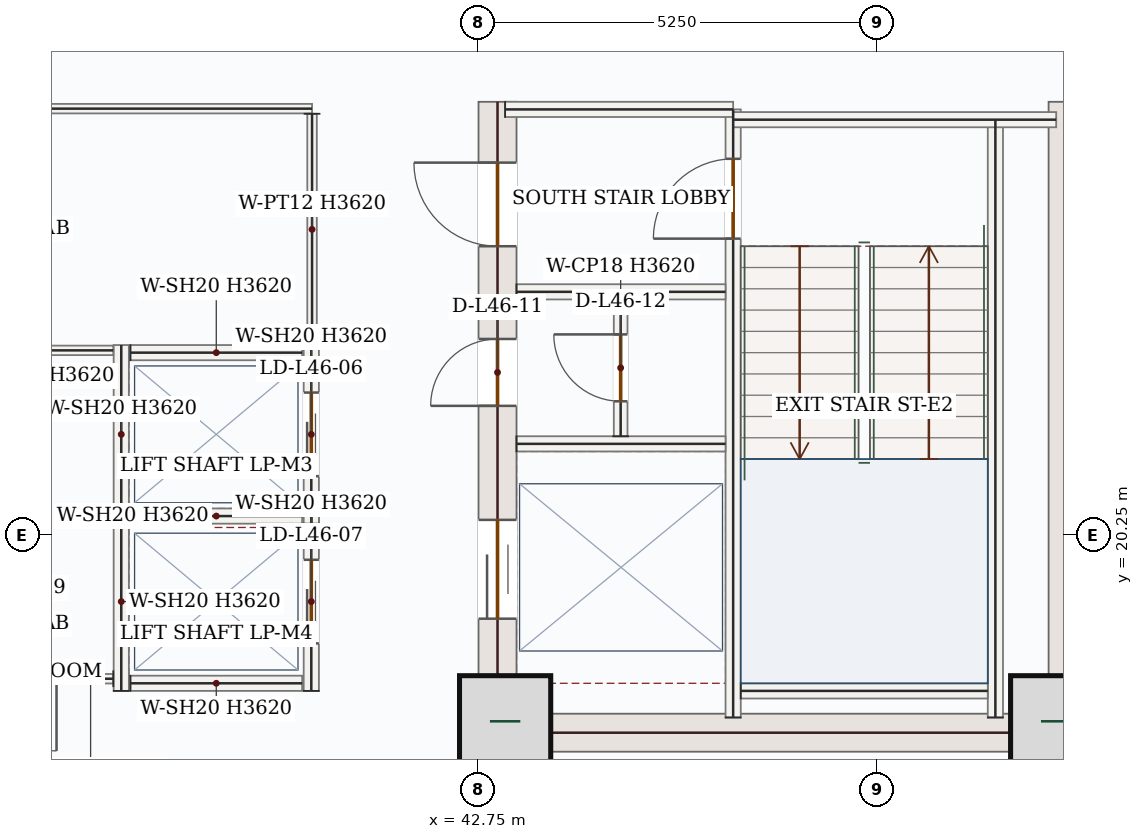
"""IFC4 building model, lengths in metres.
Left out: names, types, materials, properties, quantities, classifications, styles, units other than length and angle.
Written with IfcOpenShell. Run it as: python <this file> out.ifc"""

import sys

from ifc_helpers import new_model, si_unit, direction, frame, frame_2d, origin, origin_2d, place, context, subcontext, project, spatial, rectangle, extrude, source, transform, mapped, element, fill, save


model = new_model("IFC4")
c1 = context("Model", 3, precision=1e-05, world=origin(), true_north=direction((0.0, 1.0)))
c2 = subcontext(c1, "Body", "Model", "MODEL_VIEW")
j1 = project(units=[si_unit("LENGTHUNIT", "METRE"), si_unit("PLANEANGLEUNIT", "RADIAN")], contexts=[c1])
p1 = place(None, origin())
s1 = spatial("IfcSite", under=j1, at=p1, CompositionType="ELEMENT")
p2 = place(p1, origin())
s2 = spatial("IfcBuilding", under=s1, at=p2, CompositionType="ELEMENT")
p3 = place(p2, frame((0.0, 0.0, 198.0)))
s3 = spatial("IfcBuildingStorey", under=s2, at=p3, CompositionType="ELEMENT", Elevation=198.0)
p4 = place(p3, frame((43.0, 17.4, 0.0), z_axis=(0.0, 0.0, 1.0), x_axis=(0.0, 1.0, 0.0)))
e1 = element("IfcWall", 1, at=p4, inside=s3, PredefinedType="SHEAR", context=c2, shape_type="SweptSolid", body=[
    extrude(rectangle(XDim=8.55, YDim=0.5, at=frame_2d((4.275, 0.0))), origin(), (0.0, 0.0, 1.0), 3.62),
])
p5 = place(p4, frame((6.65, 0.0, 0.0)))
e2 = element("IfcOpeningElement", 2, at=p5, cuts=e1, PredefinedType="OPENING", context=c2, shape_type="SweptSolid", body=[
    extrude(rectangle(XDim=1.1, YDim=2.2, at=frame_2d((0.55, 1.1))), frame((0.0, 0.26, 0.0), z_axis=(0.0, -1.0, 0.0), x_axis=(1.0, 0.0, 0.0)), (0.0, 0.0, 1.0), 0.52),
])
p6 = place(p4, frame((1.75, 0.0, 0.0)))
e3 = element("IfcOpeningElement", 3, at=p6, cuts=e1, PredefinedType="OPENING", context=c2, shape_type="SweptSolid", body=[
    extrude(rectangle(XDim=1.3, YDim=2.2, at=frame_2d((0.65, 1.1))), frame((0.0, 0.26, 0.0), z_axis=(0.0, -1.0, 0.0), x_axis=(1.0, 0.0, 0.0)), (0.0, 0.0, 1.0), 0.52),
])
p7 = place(p4, frame((4.55, 0.0, 0.0)))
e4 = element("IfcOpeningElement", 4, at=p7, cuts=e1, PredefinedType="OPENING", context=c2, shape_type="SweptSolid", body=[
    extrude(rectangle(XDim=0.88, YDim=2.1, at=frame_2d((0.44, 1.05))), frame((0.0, 0.26, 0.0), z_axis=(0.0, -1.0, 0.0), x_axis=(1.0, 0.0, 0.0)), (0.0, 0.0, 1.0), 0.52),
])
m1 = source(origin(), c2, "Body", "SweptSolid", [
    extrude(rectangle(XDim=8.55, YDim=0.5, at=frame_2d((4.275, 0.0))), origin(), (0.0, 0.0, 1.0), 3.62),
])
p8 = place(p3, frame((50.5, 17.4, 0.0), z_axis=(0.0, 0.0, 1.0), x_axis=(0.0, 1.0, 0.0)))
e5 = element("IfcWall", 5, at=p8, inside=s3, PredefinedType="SHEAR", context=c2, shape_type="MappedRepresentation", body=[
    mapped(m1, transform((0.0, 0.0, 0.0), x_axis=(1.0, 0.0, 0.0), y_axis=(0.0, 1.0, 0.0), z_axis=(0.0, 0.0, 1.0), scale=1.0)),
])
m2 = source(origin(), c2, "Body", "SweptSolid", [
    extrude(rectangle(XDim=7.0, YDim=0.5, at=frame_2d((3.5, 0.0))), origin(), (0.0, 0.0, 1.0), 3.62),
])
p9 = place(p3, frame((43.25, 17.65, 0.0), z_axis=(0.0, 0.0, 1.0), x_axis=(1.0, 0.0, 0.0)))
e6 = element("IfcWall", 6, at=p9, inside=s3, PredefinedType="SHEAR", context=c2, shape_type="MappedRepresentation", body=[
    mapped(m2, transform((0.0, 0.0, 0.0), x_axis=(1.0, 0.0, 0.0), y_axis=(0.0, 1.0, 0.0), z_axis=(0.0, 0.0, 1.0), scale=1.0)),
])
m3 = source(origin(), c2, "Body", "SweptSolid", [
    extrude(rectangle(XDim=1.2, YDim=1.2, at=origin_2d()), origin(), (0.0, 0.0, 1.0), 3.9),
])
for number, where, z_axis, x_axis in (
    (7, (43.1, 17.8, 0.0), (0.0, 0.0, 1.0), (1.0, 0.0, 0.0)),
    (8, (50.35, 17.8, 0.0), (0.0, 0.0, 1.0), (1.0, 0.0, 0.0)),
):
    element("IfcColumn", number, at=place(p3, frame(where, z_axis=z_axis, x_axis=x_axis)), inside=s3, PredefinedType="COLUMN", context=c2, shape_type="MappedRepresentation", body=[
        mapped(m3, transform((0.0, 0.0, 0.0), x_axis=(1.0, 0.0, 0.0), y_axis=(0.0, 1.0, 0.0), z_axis=(0.0, 0.0, 1.0), scale=1.0)),
    ])
p10 = place(p3, frame((53.06, 18.458, 0.0), z_axis=(0.0, 0.0, 1.0), x_axis=(-0.707106781187, -0.707106781187, 0.0)))
e9 = element("IfcWall", 9, at=p10, inside=s3, PredefinedType="SOLIDWALL", context=c2, shape_type="SweptSolid", body=[
    extrude(rectangle(XDim=5.258, YDim=0.28, at=frame_2d((2.629, 0.0))), origin(), (0.0, 0.0, 1.0), 3.62),
])
p11 = place(p10, frame((1.729, 0.0, 0.85)))
e10 = element("IfcOpeningElement", 10, at=p11, cuts=e9, PredefinedType="OPENING", context=c2, shape_type="SweptSolid", body=[
    extrude(rectangle(XDim=1.8, YDim=1.75, at=frame_2d((0.9, 0.875))), frame((0.0, 0.15, 0.0), z_axis=(0.0, -1.0, 0.0), x_axis=(1.0, 0.0, 0.0)), (0.0, 0.0, 1.0), 0.3),
])
m4 = source(origin(), c2, "Body", "SweptSolid", [
    extrude(rectangle(XDim=7.87, YDim=0.2, at=frame_2d((3.935, 0.0))), origin(), (0.0, 0.0, 1.0), 3.62),
])
p12 = place(p3, frame((49.55, 17.85, 0.0), z_axis=(0.0, 0.0, 1.0), x_axis=(0.0, 1.0, 0.0)))
e11 = element("IfcWall", 11, at=p12, inside=s3, PredefinedType="SOLIDWALL", context=c2, shape_type="MappedRepresentation", body=[
    mapped(m4, transform((0.0, 0.0, 0.0), x_axis=(1.0, 0.0, 0.0), y_axis=(0.0, 1.0, 0.0), z_axis=(0.0, 0.0, 1.0), scale=1.0)),
])
p13 = place(p3, frame((46.1, 17.85, 0.0), z_axis=(0.0, 0.0, 1.0), x_axis=(0.0, 1.0, 0.0)))
e12 = element("IfcWall", 12, at=p13, inside=s3, PredefinedType="SOLIDWALL", context=c2, shape_type="SweptSolid", body=[
    extrude(rectangle(XDim=8.0, YDim=0.2, at=frame_2d((4.0, 0.0))), origin(), (0.0, 0.0, 1.0), 3.62),
])
p14 = place(p13, frame((6.3, 0.0, 0.0)))
e13 = element("IfcOpeningElement", 13, at=p14, cuts=e12, PredefinedType="OPENING", context=c2, shape_type="SweptSolid", body=[
    extrude(rectangle(XDim=1.05, YDim=2.15, at=frame_2d((0.525, 1.075))), frame((0.0, 0.11, 0.0), z_axis=(0.0, -1.0, 0.0), x_axis=(1.0, 0.0, 0.0)), (0.0, 0.0, 1.0), 0.22),
])
m5 = source(origin(), c2, "Body", "SweptSolid", [
    extrude(rectangle(XDim=3.0, YDim=0.2, at=frame_2d((1.5, 0.0))), origin(), (0.0, 0.0, 1.0), 3.62),
])
p15 = place(p3, frame((43.1, 25.85, 0.0), z_axis=(0.0, 0.0, 1.0), x_axis=(1.0, 0.0, 0.0)))
e14 = element("IfcWall", 14, at=p15, inside=s3, PredefinedType="SOLIDWALL", context=c2, shape_type="MappedRepresentation", body=[
    mapped(m5, transform((0.0, 0.0, 0.0), x_axis=(1.0, 0.0, 0.0), y_axis=(0.0, 1.0, 0.0), z_axis=(0.0, 0.0, 1.0), scale=1.0)),
])
m6 = source(origin(), c2, "Body", "SweptSolid", [
    extrude(rectangle(XDim=4.25, YDim=0.2, at=frame_2d((2.125, 0.0))), origin(), (0.0, 0.0, 1.0), 3.62),
])
p16 = place(p3, frame((46.1, 25.715, 0.0), z_axis=(0.0, 0.0, 1.0), x_axis=(1.0, 0.0, 0.0)))
e15 = element("IfcWall", 15, at=p16, inside=s3, PredefinedType="SOLIDWALL", context=c2, shape_type="MappedRepresentation", body=[
    mapped(m6, transform((0.0, 0.0, 0.0), x_axis=(1.0, 0.0, 0.0), y_axis=(0.0, 1.0, 0.0), z_axis=(0.0, 0.0, 1.0), scale=1.0)),
])
m7 = source(origin(), c2, "Body", "SweptSolid", [
    extrude(rectangle(XDim=3.25, YDim=0.2, at=frame_2d((1.625, 0.0))), origin(), (0.0, 0.0, 1.0), 3.62),
])
p17 = place(p3, frame((46.2, 18.2, 0.0), z_axis=(0.0, 0.0, 1.0), x_axis=(1.0, 0.0, 0.0)))
e16 = element("IfcWall", 16, at=p17, inside=s3, PredefinedType="SOLIDWALL", context=c2, shape_type="MappedRepresentation", body=[
    mapped(m7, transform((0.0, 0.0, 0.0), x_axis=(1.0, 0.0, 0.0), y_axis=(0.0, 1.0, 0.0), z_axis=(0.0, 0.0, 1.0), scale=1.0)),
])
m8 = source(origin(), c2, "Body", "SweptSolid", [
    extrude(rectangle(XDim=2.75, YDim=0.2, at=frame_2d((1.375, 0.0))), origin(), (0.0, 0.0, 1.0), 3.62),
])
for number, where, z_axis, x_axis in (
    (17, (43.25, 23.45, 0.0), (0.0, 0.0, 1.0), (1.0, 0.0, 0.0)),
    (18, (43.25, 21.45, 0.0), (0.0, 0.0, 1.0), (1.0, 0.0, 0.0)),
):
    element("IfcWall", number, at=place(p3, frame(where, z_axis=z_axis, x_axis=x_axis)), inside=s3, PredefinedType="SOLIDWALL", context=c2, shape_type="MappedRepresentation", body=[
        mapped(m8, transform((0.0, 0.0, 0.0), x_axis=(1.0, 0.0, 0.0), y_axis=(0.0, 1.0, 0.0), z_axis=(0.0, 0.0, 1.0), scale=1.0)),
    ])
p18 = place(p3, frame((44.62, 21.55, 0.0), z_axis=(0.0, 0.0, 1.0), x_axis=(0.0, 1.0, 0.0)))
e19 = element("IfcWall", 19, at=p18, inside=s3, PredefinedType="PARTITIONING", context=c2, shape_type="SweptSolid", body=[
    extrude(rectangle(XDim=1.8, YDim=0.18, at=frame_2d((0.9, 0.0))), origin(), (0.0, 0.0, 1.0), 3.62),
])
p19 = place(p18, frame((0.46, 0.0, 0.0)))
e20 = element("IfcOpeningElement", 20, at=p19, cuts=e19, PredefinedType="OPENING", context=c2, shape_type="SweptSolid", body=[
    extrude(rectangle(XDim=0.88, YDim=2.1, at=frame_2d((0.44, 1.05))), frame((0.0, 0.1, 0.0), z_axis=(0.0, -1.0, 0.0), x_axis=(1.0, 0.0, 0.0)), (0.0, 0.0, 1.0), 0.2),
])
m9 = source(origin(), c2, "Body", "SweptSolid", [
    extrude(rectangle(XDim=2.35, YDim=0.2, at=frame_2d((1.175, 0.0))), origin(), (0.0, 0.0, 1.0), 3.62),
])
p20 = place(p3, frame((38.05, 20.4, 0.0), z_axis=(0.0, 0.0, 1.0), x_axis=(0.0, 1.0, 0.0)))
e21 = element("IfcWall", 21, at=p20, inside=s3, PredefinedType="SOLIDWALL", context=c2, shape_type="MappedRepresentation", body=[
    mapped(m9, transform((0.0, 0.0, 0.0), x_axis=(1.0, 0.0, 0.0), y_axis=(0.0, 1.0, 0.0), z_axis=(0.0, 0.0, 1.0), scale=1.0)),
])
p21 = place(p3, frame((40.55, 20.4, 0.0), z_axis=(0.0, 0.0, 1.0), x_axis=(0.0, 1.0, 0.0)))
e22 = element("IfcWall", 22, at=p21, inside=s3, PredefinedType="SOLIDWALL", context=c2, shape_type="SweptSolid", body=[
    extrude(rectangle(XDim=2.35, YDim=0.2, at=frame_2d((1.175, 0.0))), origin(), (0.0, 0.0, 1.0), 3.62),
])
p22 = place(p21, frame((0.625, 0.0, 0.0)))
e23 = element("IfcOpeningElement", 23, at=p22, cuts=e22, PredefinedType="OPENING", context=c2, shape_type="SweptSolid", body=[
    extrude(rectangle(XDim=1.1, YDim=2.15, at=frame_2d((0.55, 1.075))), frame((0.0, 0.11, 0.0), z_axis=(0.0, -1.0, 0.0), x_axis=(1.0, 0.0, 0.0)), (0.0, 0.0, 1.0), 0.22),
])
m10 = source(origin(), c2, "Body", "SweptSolid", [
    extrude(rectangle(XDim=2.26, YDim=0.2, at=frame_2d((1.13, 0.0))), origin(), (0.0, 0.0, 1.0), 3.62),
])
for number, where, z_axis, x_axis in (
    (24, (38.17, 20.5, 0.0), (0.0, 0.0, 1.0), (1.0, 0.0, 0.0)),
    (25, (38.17, 22.65, 0.0), (0.0, 0.0, 1.0), (1.0, 0.0, 0.0)),
):
    element("IfcWall", number, at=place(p3, frame(where, z_axis=z_axis, x_axis=x_axis)), inside=s3, PredefinedType="SOLIDWALL", context=c2, shape_type="MappedRepresentation", body=[
        mapped(m10, transform((0.0, 0.0, 0.0), x_axis=(1.0, 0.0, 0.0), y_axis=(0.0, 1.0, 0.0), z_axis=(0.0, 0.0, 1.0), scale=1.0)),
    ])
p23 = place(p3, frame((38.05, 18.2, 0.0), z_axis=(0.0, 0.0, 1.0), x_axis=(0.0, 1.0, 0.0)))
e26 = element("IfcWall", 26, at=p23, inside=s3, PredefinedType="SOLIDWALL", context=c2, shape_type="MappedRepresentation", body=[
    mapped(m9, transform((0.0, 0.0, 0.0), x_axis=(1.0, 0.0, 0.0), y_axis=(0.0, 1.0, 0.0), z_axis=(0.0, 0.0, 1.0), scale=1.0)),
])
p24 = place(p3, frame((40.55, 18.2, 0.0), z_axis=(0.0, 0.0, 1.0), x_axis=(0.0, 1.0, 0.0)))
e27 = element("IfcWall", 27, at=p24, inside=s3, PredefinedType="SOLIDWALL", context=c2, shape_type="SweptSolid", body=[
    extrude(rectangle(XDim=2.35, YDim=0.2, at=frame_2d((1.175, 0.0))), origin(), (0.0, 0.0, 1.0), 3.62),
])
p25 = place(p24, frame((0.625, 0.0, 0.0)))
e28 = element("IfcOpeningElement", 28, at=p25, cuts=e27, PredefinedType="OPENING", context=c2, shape_type="SweptSolid", body=[
    extrude(rectangle(XDim=1.1, YDim=2.15, at=frame_2d((0.55, 1.075))), frame((0.0, 0.11, 0.0), z_axis=(0.0, -1.0, 0.0), x_axis=(1.0, 0.0, 0.0)), (0.0, 0.0, 1.0), 0.22),
])
p26 = place(p3, frame((38.17, 18.3, 0.0), z_axis=(0.0, 0.0, 1.0), x_axis=(1.0, 0.0, 0.0)))
e29 = element("IfcWall", 29, at=p26, inside=s3, PredefinedType="SOLIDWALL", context=c2, shape_type="MappedRepresentation", body=[
    mapped(m10, transform((0.0, 0.0, 0.0), x_axis=(1.0, 0.0, 0.0), y_axis=(0.0, 1.0, 0.0), z_axis=(0.0, 0.0, 1.0), scale=1.0)),
])
m11 = source(origin(), c2, "Body", "SweptSolid", [
    extrude(rectangle(XDim=1.915, YDim=0.125, at=frame_2d((0.958, 0.0))), origin(), (0.0, 0.0, 1.0), 3.62),
])
p27 = place(p3, frame((36.03, 22.68, 0.0), z_axis=(0.0, 0.0, 1.0), x_axis=(1.0, 0.0, 0.0)))
e30 = element("IfcWall", 30, at=p27, inside=s3, PredefinedType="PARTITIONING", context=c2, shape_type="MappedRepresentation", body=[
    mapped(m11, transform((0.0, 0.0, 0.0), x_axis=(1.0, 0.0, 0.0), y_axis=(0.0, 1.0, 0.0), z_axis=(0.0, 0.0, 1.0), scale=1.0)),
])
p28 = place(p3, frame((37.945, 18.36, 0.0), z_axis=(0.0, 0.0, 1.0), x_axis=(-1.0, 0.0, 0.0)))
e31 = element("IfcWall", 31, at=p28, inside=s3, PredefinedType="PARTITIONING", context=c2, shape_type="SweptSolid", body=[
    extrude(rectangle(XDim=1.907, YDim=0.125, at=frame_2d((0.954, 0.0))), origin(), (0.0, 0.0, 1.0), 3.62),
])
p29 = place(p28, frame((0.747, 0.0, 0.0)))
e32 = element("IfcOpeningElement", 32, at=p29, cuts=e31, PredefinedType="OPENING", context=c2, shape_type="SweptSolid", body=[
    extrude(rectangle(XDim=0.95, YDim=2.15, at=frame_2d((0.475, 1.075))), frame((0.0, 0.073, 0.0), z_axis=(0.0, -1.0, 0.0), x_axis=(1.0, 0.0, 0.0)), (0.0, 0.0, 1.0), 0.145),
])
p30 = place(p3, frame((31.508, 25.86, 0.0), z_axis=(0.0, 0.0, 1.0), x_axis=(1.0, 0.0, 0.0)))
e33 = element("IfcWall", 33, at=p30, inside=s3, PredefinedType="PARTITIONING", context=c2, shape_type="SweptSolid", body=[
    extrude(rectangle(XDim=9.052, YDim=0.125, at=frame_2d((4.526, 0.0))), origin(), (0.0, 0.0, 1.0), 3.62),
])
p31 = place(p30, frame((4.051, 0.0, 0.0)))
e34 = element("IfcOpeningElement", 34, at=p31, cuts=e33, PredefinedType="OPENING", context=c2, shape_type="SweptSolid", body=[
    extrude(rectangle(XDim=0.95, YDim=2.15, at=frame_2d((0.475, 1.075))), frame((0.0, 0.073, 0.0), z_axis=(0.0, -1.0, 0.0), x_axis=(1.0, 0.0, 0.0)), (0.0, 0.0, 1.0), 0.145),
])
m12 = source(origin(), c2, "Body", "SweptSolid", [
    extrude(rectangle(XDim=3.042, YDim=0.125, at=frame_2d((1.521, 0.0))), origin(), (0.0, 0.0, 1.0), 3.62),
])
p32 = place(p3, frame((40.56, 25.792, 0.0), z_axis=(0.0, 0.0, 1.0), x_axis=(0.0, -1.0, 0.0)))
e35 = element("IfcWall", 35, at=p32, inside=s3, PredefinedType="PARTITIONING", context=c2, shape_type="MappedRepresentation", body=[
    mapped(m12, transform((0.0, 0.0, 0.0), x_axis=(1.0, 0.0, 0.0), y_axis=(0.0, 1.0, 0.0), z_axis=(0.0, 0.0, 1.0), scale=1.0)),
])
m13 = source(origin(), c2, "Body", "SweptSolid", [
    extrude(rectangle(XDim=1.05, YDim=2.15, at=frame_2d((0.525, 1.075))), frame((0.0, 0.025, 0.0), z_axis=(0.0, -1.0, 0.0), x_axis=(1.0, 0.0, 0.0)), (0.0, 0.0, 1.0), 0.05),
])
p33 = place(p14, origin())
e36 = element("IfcDoor", 36, at=p33, inside=s3, OperationType="SINGLE_SWING_LEFT", PredefinedType="DOOR", context=c2, shape_type="MappedRepresentation", body=[
    mapped(m13, transform((0.0, 0.0, 0.0), x_axis=(1.0, 0.0, 0.0), y_axis=(0.0, 1.0, 0.0), z_axis=(0.0, 0.0, 1.0), scale=1.0)),
])
fill(e13, e36)
m14 = source(origin(), c2, "Body", "SweptSolid", [
    extrude(rectangle(XDim=1.1, YDim=2.2, at=frame_2d((0.55, 1.1))), frame((0.0, 0.025, 0.0), z_axis=(0.0, -1.0, 0.0), x_axis=(1.0, 0.0, 0.0)), (0.0, 0.0, 1.0), 0.05),
])
p34 = place(p5, origin())
e37 = element("IfcDoor", 37, at=p34, inside=s3, OperationType="SINGLE_SWING_RIGHT", PredefinedType="DOOR", context=c2, shape_type="MappedRepresentation", body=[
    mapped(m14, transform((0.0, 0.0, 0.0), x_axis=(1.0, 0.0, 0.0), y_axis=(0.0, 1.0, 0.0), z_axis=(0.0, 0.0, 1.0), scale=1.0)),
])
fill(e2, e37)
m15 = source(origin(), c2, "Body", "SweptSolid", [
    extrude(rectangle(XDim=1.3, YDim=2.2, at=frame_2d((0.65, 1.1))), frame((0.0, 0.025, 0.0), z_axis=(0.0, -1.0, 0.0), x_axis=(1.0, 0.0, 0.0)), (0.0, 0.0, 1.0), 0.05),
])
p35 = place(p6, origin())
e38 = element("IfcDoor", 38, at=p35, inside=s3, OperationType="DOUBLE_DOOR_SLIDING", PredefinedType="DOOR", context=c2, shape_type="MappedRepresentation", body=[
    mapped(m15, transform((0.0, 0.0, 0.0), x_axis=(1.0, 0.0, 0.0), y_axis=(0.0, 1.0, 0.0), z_axis=(0.0, 0.0, 1.0), scale=1.0)),
])
fill(e3, e38)
m16 = source(origin(), c2, "Body", "SweptSolid", [
    extrude(rectangle(XDim=0.88, YDim=2.1, at=frame_2d((0.44, 1.05))), frame((0.0, 0.025, 0.0), z_axis=(0.0, -1.0, 0.0), x_axis=(1.0, 0.0, 0.0)), (0.0, 0.0, 1.0), 0.05),
])
p36 = place(p7, origin())
e39 = element("IfcDoor", 39, at=p36, inside=s3, OperationType="SINGLE_SWING_LEFT", PredefinedType="DOOR", context=c2, shape_type="MappedRepresentation", body=[
    mapped(m16, transform((0.0, 0.0, 0.0), x_axis=(1.0, 0.0, 0.0), y_axis=(0.0, 1.0, 0.0), z_axis=(0.0, 0.0, 1.0), scale=1.0)),
])
fill(e4, e39)
p37 = place(p19, origin())
e40 = element("IfcDoor", 40, at=p37, inside=s3, OperationType="SINGLE_SWING_RIGHT", PredefinedType="DOOR", context=c2, shape_type="MappedRepresentation", body=[
    mapped(m16, transform((0.0, 0.0, 0.0), x_axis=(1.0, 0.0, 0.0), y_axis=(0.0, 1.0, 0.0), z_axis=(0.0, 0.0, 1.0), scale=1.0)),
])
fill(e20, e40)
m17 = source(origin(), c2, "Body", "SweptSolid", [
    extrude(rectangle(XDim=1.1, YDim=2.15, at=frame_2d((0.55, 1.075))), frame((0.0, 0.025, 0.0), z_axis=(0.0, -1.0, 0.0), x_axis=(1.0, 0.0, 0.0)), (0.0, 0.0, 1.0), 0.05),
])
p38 = place(p22, origin())
e41 = element("IfcDoor", 41, at=p38, inside=s3, OperationType="DOUBLE_DOOR_SLIDING", PredefinedType="DOOR", context=c2, shape_type="MappedRepresentation", body=[
    mapped(m17, transform((0.0, 0.0, 0.0), x_axis=(1.0, 0.0, 0.0), y_axis=(0.0, 1.0, 0.0), z_axis=(0.0, 0.0, 1.0), scale=1.0)),
])
fill(e23, e41)
p39 = place(p25, origin())
e42 = element("IfcDoor", 42, at=p39, inside=s3, OperationType="DOUBLE_DOOR_SLIDING", PredefinedType="DOOR", context=c2, shape_type="MappedRepresentation", body=[
    mapped(m17, transform((0.0, 0.0, 0.0), x_axis=(1.0, 0.0, 0.0), y_axis=(0.0, 1.0, 0.0), z_axis=(0.0, 0.0, 1.0), scale=1.0)),
])
fill(e28, e42)
m18 = source(origin(), c2, "Body", "SweptSolid", [
    extrude(rectangle(XDim=0.95, YDim=2.15, at=frame_2d((0.475, 1.075))), frame((0.0, 0.025, 0.0), z_axis=(0.0, -1.0, 0.0), x_axis=(1.0, 0.0, 0.0)), (0.0, 0.0, 1.0), 0.05),
])
p40 = place(p29, origin())
e43 = element("IfcDoor", 43, at=p40, inside=s3, OperationType="SINGLE_SWING_LEFT", PredefinedType="DOOR", context=c2, shape_type="MappedRepresentation", body=[
    mapped(m18, transform((0.0, 0.0, 0.0), x_axis=(1.0, 0.0, 0.0), y_axis=(0.0, 1.0, 0.0), z_axis=(0.0, 0.0, 1.0), scale=1.0)),
])
fill(e32, e43)
save(model, sys.argv[1])
